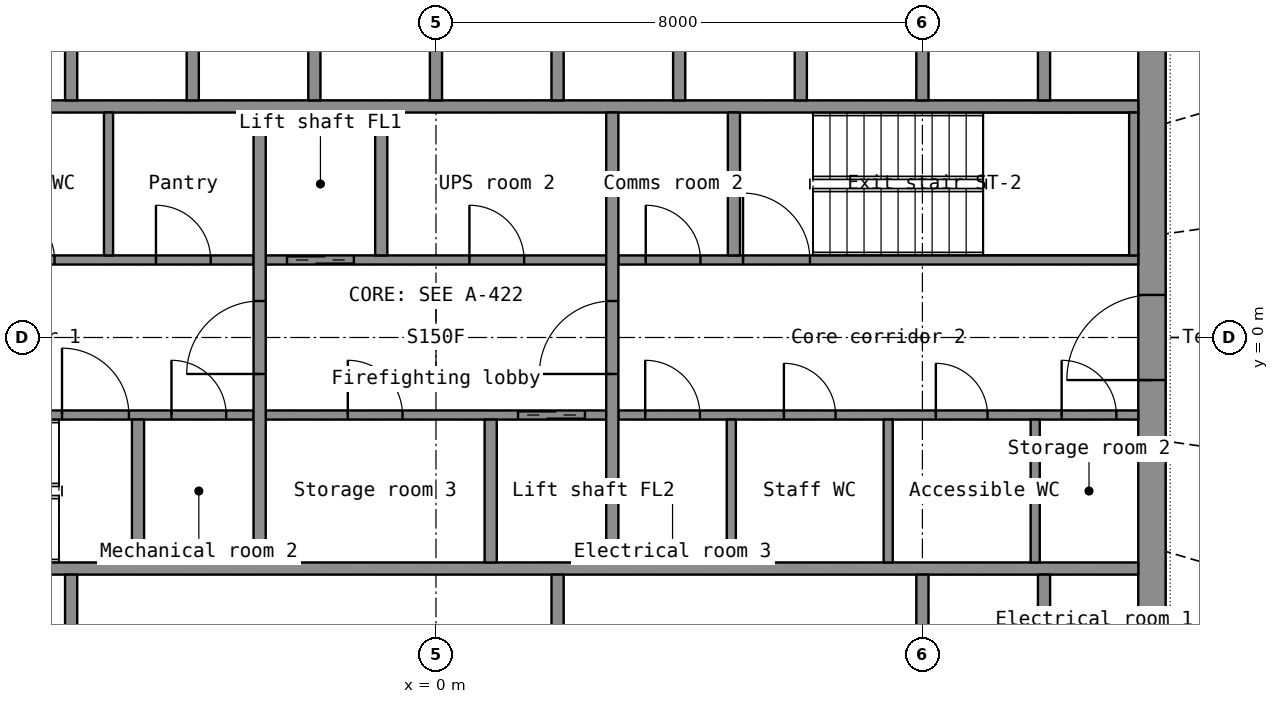
"""IFC4 building model, lengths in metres.
Left out: names, types, materials, properties, quantities, classifications, styles, units other than length and angle.
Written with IfcOpenShell. Run it as: python <this file> out.ifc"""

import sys

from ifc_helpers import new_model, si_unit, direction, frame, frame_2d, origin, place, context, subcontext, project, spatial, rectangle, extrude, element, fill, save


model = new_model("IFC4")
c1 = context("Model", 3, precision=1e-05, world=origin(), true_north=direction((0.0, 1.0)))
c2 = subcontext(c1, "Body", "Model", "MODEL_VIEW")
j1 = project(units=[si_unit("LENGTHUNIT", "METRE"), si_unit("PLANEANGLEUNIT", "RADIAN")], contexts=[c1])
p1 = place(None, origin())
s1 = spatial("IfcSite", under=j1, at=p1, CompositionType="ELEMENT")
p2 = place(p1, origin())
s2 = spatial("IfcBuilding", under=s1, at=p2, CompositionType="ELEMENT")
p3 = place(p2, frame((0.0, 0.0, 160.8)))
s3 = spatial("IfcBuildingStorey", under=s2, at=p3, CompositionType="ELEMENT", Elevation=160.8)
p4 = place(p3, frame((11.775, -7.2, 0.0), z_axis=(0.0, 0.0, 1.0), x_axis=(0.0, 1.0, 0.0)))
e1 = element("IfcWall", 1, at=p4, inside=s3, PredefinedType="SHEAR", context=c2, shape_type="SweptSolid", body=[
    extrude(rectangle(XDim=14.4, YDim=0.45, at=frame_2d((7.2, 0.0))), origin(), (0.0, 0.0, 1.0), 3.3),
])
p5 = place(p4, frame((6.5, 0.0, 0.0)))
e2 = element("IfcOpeningElement", 2, at=p5, cuts=e1, PredefinedType="OPENING", context=c2, shape_type="SweptSolid", body=[
    extrude(rectangle(XDim=1.4, YDim=2.2, at=frame_2d((0.7, 1.1))), frame((0.0, 0.235, 0.0), z_axis=(0.0, -1.0, 0.0), x_axis=(1.0, 0.0, 0.0)), (0.0, 0.0, 1.0), 0.47),
])
for number, where, z_axis, x_axis in (
    (3, (-11.55, -3.8, 0.0), (0.0, 0.0, 1.0), (1.0, 0.0, 0.0)),
    (4, (-11.55, 3.8, 0.0), (0.0, 0.0, 1.0), (1.0, 0.0, 0.0)),
):
    element("IfcWall", number, at=place(p3, frame(where, z_axis=z_axis, x_axis=x_axis)), inside=s3, PredefinedType="SHEAR", context=c2, shape_type="SweptSolid", body=[
        extrude(rectangle(XDim=23.1, YDim=0.2, at=frame_2d((11.55, 0.0))), origin(), (0.0, 0.0, 1.0), 3.3),
    ])
for number, where, z_axis, x_axis in (
    (5, (8.0, -6.75, 0.0), (0.0, 0.0, 1.0), (0.0, 1.0, 0.0)),
    (6, (10.0, -6.75, 0.0), (0.0, 0.0, 1.0), (0.0, 1.0, 0.0)),
):
    element("IfcWall", number, at=place(p3, frame(where, z_axis=z_axis, x_axis=x_axis)), inside=s3, PredefinedType="SHEAR", context=c2, shape_type="SweptSolid", body=[
        extrude(rectangle(XDim=2.85, YDim=0.2, at=frame_2d((1.425, 0.0))), origin(), (0.0, 0.0, 1.0), 3.3),
    ])
for number, where, z_axis, x_axis in (
    (7, (-6.0, -6.75, 0.0), (0.0, 0.0, 1.0), (0.0, 1.0, 0.0)),
    (8, (2.0, -6.75, 0.0), (0.0, 0.0, 1.0), (0.0, 1.0, 0.0)),
):
    element("IfcWall", number, at=place(p3, frame(where, z_axis=z_axis, x_axis=x_axis)), inside=s3, PredefinedType="PARTITIONING", context=c2, shape_type="SweptSolid", body=[
        extrude(rectangle(XDim=2.85, YDim=0.2, at=frame_2d((1.425, 0.0))), origin(), (0.0, 0.0, 1.0), 3.3),
    ])
for number, where, z_axis, x_axis in (
    (9, (-6.0, 3.9, 0.0), (0.0, 0.0, 1.0), (0.0, 1.0, 0.0)),
    (10, (-4.0, 3.9, 0.0), (0.0, 0.0, 1.0), (0.0, 1.0, 0.0)),
    (11, (-2.0, 3.9, 0.0), (0.0, 0.0, 1.0), (0.0, 1.0, 0.0)),
    (12, (0.0, 3.9, 0.0), (0.0, 0.0, 1.0), (0.0, 1.0, 0.0)),
    (13, (2.0, 3.9, 0.0), (0.0, 0.0, 1.0), (0.0, 1.0, 0.0)),
    (14, (4.0, 3.9, 0.0), (0.0, 0.0, 1.0), (0.0, 1.0, 0.0)),
    (15, (6.0, 3.9, 0.0), (0.0, 0.0, 1.0), (0.0, 1.0, 0.0)),
    (16, (8.0, 3.9, 0.0), (0.0, 0.0, 1.0), (0.0, 1.0, 0.0)),
    (17, (10.0, 3.9, 0.0), (0.0, 0.0, 1.0), (0.0, 1.0, 0.0)),
):
    element("IfcWall", number, at=place(p3, frame(where, z_axis=z_axis, x_axis=x_axis)), inside=s3, PredefinedType="SHEAR", context=c2, shape_type="SweptSolid", body=[
        extrude(rectangle(XDim=2.85, YDim=0.2, at=frame_2d((1.425, 0.0))), origin(), (0.0, 0.0, 1.0), 3.3),
    ])
p6 = place(p3, frame((-11.55, -1.275, 0.0), z_axis=(0.0, 0.0, 1.0), x_axis=(1.0, 0.0, 0.0)))
e18 = element("IfcWall", 18, at=p6, inside=s3, PredefinedType="SHEAR", context=c2, shape_type="SweptSolid", body=[
    extrude(rectangle(XDim=8.55, YDim=0.15, at=frame_2d((4.275, 0.0))), origin(), (0.0, 0.0, 1.0), 3.3),
])
p7 = place(p6, frame((5.4, 0.0, 0.0)))
e19 = element("IfcOpeningElement", 19, at=p7, cuts=e18, PredefinedType="OPENING", context=c2, shape_type="SweptSolid", body=[
    extrude(rectangle(XDim=1.1, YDim=2.15, at=frame_2d((0.55, 1.075))), frame((0.0, 0.085, 0.0), z_axis=(0.0, -1.0, 0.0), x_axis=(1.0, 0.0, 0.0)), (0.0, 0.0, 1.0), 0.17),
])
p8 = place(p6, frame((7.2, 0.0, 0.0)))
e20 = element("IfcOpeningElement", 20, at=p8, cuts=e18, PredefinedType="OPENING", context=c2, shape_type="SweptSolid", body=[
    extrude(rectangle(XDim=0.9, YDim=2.1, at=frame_2d((0.45, 1.05))), frame((0.0, 0.085, 0.0), z_axis=(0.0, -1.0, 0.0), x_axis=(1.0, 0.0, 0.0)), (0.0, 0.0, 1.0), 0.17),
])
p9 = place(p3, frame((-2.8, -1.275, 0.0), z_axis=(0.0, 0.0, 1.0), x_axis=(1.0, 0.0, 0.0)))
e21 = element("IfcWall", 21, at=p9, inside=s3, PredefinedType="SHEAR", context=c2, shape_type="SweptSolid", body=[
    extrude(rectangle(XDim=5.6, YDim=0.15, at=frame_2d((2.8, 0.0))), origin(), (0.0, 0.0, 1.0), 3.3),
])
p10 = place(p9, frame((4.15, 0.0, 0.0)))
e22 = element("IfcOpeningElement", 22, at=p10, cuts=e21, PredefinedType="OPENING", context=c2, shape_type="SweptSolid", body=[
    extrude(rectangle(XDim=1.1, YDim=2.2, at=frame_2d((0.55, 1.1))), frame((0.0, 0.085, 0.0), z_axis=(0.0, -1.0, 0.0), x_axis=(1.0, 0.0, 0.0)), (0.0, 0.0, 1.0), 0.17),
])
p11 = place(p9, frame((1.35, 0.0, 0.0)))
e23 = element("IfcOpeningElement", 23, at=p11, cuts=e21, PredefinedType="OPENING", context=c2, shape_type="SweptSolid", body=[
    extrude(rectangle(XDim=0.9, YDim=2.1, at=frame_2d((0.45, 1.05))), frame((0.0, 0.085, 0.0), z_axis=(0.0, -1.0, 0.0), x_axis=(1.0, 0.0, 0.0)), (0.0, 0.0, 1.0), 0.17),
])
p12 = place(p3, frame((3.0, -1.275, 0.0), z_axis=(0.0, 0.0, 1.0), x_axis=(1.0, 0.0, 0.0)))
e24 = element("IfcWall", 24, at=p12, inside=s3, PredefinedType="PARTITIONING", context=c2, shape_type="SweptSolid", body=[
    extrude(rectangle(XDim=8.55, YDim=0.15, at=frame_2d((4.275, 0.0))), origin(), (0.0, 0.0, 1.0), 3.3),
])
p13 = place(p12, frame((0.441, 0.0, 0.0)))
e25 = element("IfcOpeningElement", 25, at=p13, cuts=e24, PredefinedType="OPENING", context=c2, shape_type="SweptSolid", body=[
    extrude(rectangle(XDim=0.9, YDim=2.1, at=frame_2d((0.45, 1.05))), frame((0.0, 0.085, 0.0), z_axis=(0.0, -1.0, 0.0), x_axis=(1.0, 0.0, 0.0)), (0.0, 0.0, 1.0), 0.17),
])
p14 = place(p12, frame((2.722, 0.0, 0.0)))
e26 = element("IfcOpeningElement", 26, at=p14, cuts=e24, PredefinedType="OPENING", context=c2, shape_type="SweptSolid", body=[
    extrude(rectangle(XDim=0.85, YDim=2.1, at=frame_2d((0.425, 1.05))), frame((0.0, 0.085, 0.0), z_axis=(0.0, -1.0, 0.0), x_axis=(1.0, 0.0, 0.0)), (0.0, 0.0, 1.0), 0.17),
])
p15 = place(p12, frame((5.221, 0.0, 0.0)))
e27 = element("IfcOpeningElement", 27, at=p15, cuts=e24, PredefinedType="OPENING", context=c2, shape_type="SweptSolid", body=[
    extrude(rectangle(XDim=0.85, YDim=2.1, at=frame_2d((0.425, 1.05))), frame((0.0, 0.085, 0.0), z_axis=(0.0, -1.0, 0.0), x_axis=(1.0, 0.0, 0.0)), (0.0, 0.0, 1.0), 0.17),
])
p16 = place(p12, frame((7.29, 0.0, 0.0)))
e28 = element("IfcOpeningElement", 28, at=p16, cuts=e24, PredefinedType="OPENING", context=c2, shape_type="SweptSolid", body=[
    extrude(rectangle(XDim=0.9, YDim=2.1, at=frame_2d((0.45, 1.05))), frame((0.0, 0.085, 0.0), z_axis=(0.0, -1.0, 0.0), x_axis=(1.0, 0.0, 0.0)), (0.0, 0.0, 1.0), 0.17),
])
p17 = place(p3, frame((-11.55, 1.275, 0.0), z_axis=(0.0, 0.0, 1.0), x_axis=(1.0, 0.0, 0.0)))
e29 = element("IfcWall", 29, at=p17, inside=s3, PredefinedType="PARTITIONING", context=c2, shape_type="SweptSolid", body=[
    extrude(rectangle(XDim=8.55, YDim=0.15, at=frame_2d((4.275, 0.0))), origin(), (0.0, 0.0, 1.0), 3.3),
])
p18 = place(p17, frame((1.308, 0.0, 0.0)))
e30 = element("IfcOpeningElement", 30, at=p18, cuts=e29, PredefinedType="OPENING", context=c2, shape_type="SweptSolid", body=[
    extrude(rectangle(XDim=0.85, YDim=2.1, at=frame_2d((0.425, 1.05))), frame((0.0, 0.085, 0.0), z_axis=(0.0, -1.0, 0.0), x_axis=(1.0, 0.0, 0.0)), (0.0, 0.0, 1.0), 0.17),
])
p19 = place(p17, frame((4.427, 0.0, 0.0)))
e31 = element("IfcOpeningElement", 31, at=p19, cuts=e29, PredefinedType="OPENING", context=c2, shape_type="SweptSolid", body=[
    extrude(rectangle(XDim=0.85, YDim=2.1, at=frame_2d((0.425, 1.05))), frame((0.0, 0.085, 0.0), z_axis=(0.0, -1.0, 0.0), x_axis=(1.0, 0.0, 0.0)), (0.0, 0.0, 1.0), 0.17),
])
p20 = place(p17, frame((6.945, 0.0, 0.0)))
e32 = element("IfcOpeningElement", 32, at=p20, cuts=e29, PredefinedType="OPENING", context=c2, shape_type="SweptSolid", body=[
    extrude(rectangle(XDim=0.9, YDim=2.1, at=frame_2d((0.45, 1.05))), frame((0.0, 0.085, 0.0), z_axis=(0.0, -1.0, 0.0), x_axis=(1.0, 0.0, 0.0)), (0.0, 0.0, 1.0), 0.17),
])
p21 = place(p3, frame((-2.8, 1.275, 0.0), z_axis=(0.0, 0.0, 1.0), x_axis=(1.0, 0.0, 0.0)))
e33 = element("IfcWall", 33, at=p21, inside=s3, PredefinedType="SHEAR", context=c2, shape_type="SweptSolid", body=[
    extrude(rectangle(XDim=5.6, YDim=0.15, at=frame_2d((2.8, 0.0))), origin(), (0.0, 0.0, 1.0), 3.3),
])
p22 = place(p21, frame((0.35, 0.0, 0.0)))
e34 = element("IfcOpeningElement", 34, at=p22, cuts=e33, PredefinedType="OPENING", context=c2, shape_type="SweptSolid", body=[
    extrude(rectangle(XDim=1.1, YDim=2.2, at=frame_2d((0.55, 1.1))), frame((0.0, 0.085, 0.0), z_axis=(0.0, -1.0, 0.0), x_axis=(1.0, 0.0, 0.0)), (0.0, 0.0, 1.0), 0.17),
])
p23 = place(p21, frame((3.35, 0.0, 0.0)))
e35 = element("IfcOpeningElement", 35, at=p23, cuts=e33, PredefinedType="OPENING", context=c2, shape_type="SweptSolid", body=[
    extrude(rectangle(XDim=0.9, YDim=2.1, at=frame_2d((0.45, 1.05))), frame((0.0, 0.085, 0.0), z_axis=(0.0, -1.0, 0.0), x_axis=(1.0, 0.0, 0.0)), (0.0, 0.0, 1.0), 0.17),
])
p24 = place(p3, frame((3.0, 1.275, 0.0), z_axis=(0.0, 0.0, 1.0), x_axis=(1.0, 0.0, 0.0)))
e36 = element("IfcWall", 36, at=p24, inside=s3, PredefinedType="SHEAR", context=c2, shape_type="SweptSolid", body=[
    extrude(rectangle(XDim=8.55, YDim=0.15, at=frame_2d((4.275, 0.0))), origin(), (0.0, 0.0, 1.0), 3.3),
])
p25 = place(p24, frame((2.05, 0.0, 0.0)))
e37 = element("IfcOpeningElement", 37, at=p25, cuts=e36, PredefinedType="OPENING", context=c2, shape_type="SweptSolid", body=[
    extrude(rectangle(XDim=1.1, YDim=2.15, at=frame_2d((0.55, 1.075))), frame((0.0, 0.085, 0.0), z_axis=(0.0, -1.0, 0.0), x_axis=(1.0, 0.0, 0.0)), (0.0, 0.0, 1.0), 0.17),
])
p26 = place(p24, frame((0.45, 0.0, 0.0)))
e38 = element("IfcOpeningElement", 38, at=p26, cuts=e36, PredefinedType="OPENING", context=c2, shape_type="SweptSolid", body=[
    extrude(rectangle(XDim=0.9, YDim=2.1, at=frame_2d((0.45, 1.05))), frame((0.0, 0.085, 0.0), z_axis=(0.0, -1.0, 0.0), x_axis=(1.0, 0.0, 0.0)), (0.0, 0.0, 1.0), 0.17),
])
p27 = place(p3, frame((-2.9, -3.7, 0.0), z_axis=(0.0, 0.0, 1.0), x_axis=(0.0, 1.0, 0.0)))
e39 = element("IfcWall", 39, at=p27, inside=s3, PredefinedType="SHEAR", context=c2, shape_type="SweptSolid", body=[
    extrude(rectangle(XDim=7.4, YDim=0.2, at=frame_2d((3.7, 0.0))), origin(), (0.0, 0.0, 1.0), 3.3),
])
p28 = place(p27, frame((3.1, 0.0, 0.0)))
e40 = element("IfcOpeningElement", 40, at=p28, cuts=e39, PredefinedType="OPENING", context=c2, shape_type="SweptSolid", body=[
    extrude(rectangle(XDim=1.2, YDim=2.2, at=frame_2d((0.6, 1.1))), frame((0.0, 0.11, 0.0), z_axis=(0.0, -1.0, 0.0), x_axis=(1.0, 0.0, 0.0)), (0.0, 0.0, 1.0), 0.22),
])
p29 = place(p3, frame((2.9, -3.7, 0.0), z_axis=(0.0, 0.0, 1.0), x_axis=(0.0, 1.0, 0.0)))
e41 = element("IfcWall", 41, at=p29, inside=s3, PredefinedType="SHEAR", context=c2, shape_type="SweptSolid", body=[
    extrude(rectangle(XDim=7.4, YDim=0.2, at=frame_2d((3.7, 0.0))), origin(), (0.0, 0.0, 1.0), 3.3),
])
p30 = place(p29, frame((3.1, 0.0, 0.0)))
e42 = element("IfcOpeningElement", 42, at=p30, cuts=e41, PredefinedType="OPENING", context=c2, shape_type="SweptSolid", body=[
    extrude(rectangle(XDim=1.2, YDim=2.2, at=frame_2d((0.6, 1.1))), frame((0.0, 0.11, 0.0), z_axis=(0.0, -1.0, 0.0), x_axis=(1.0, 0.0, 0.0)), (0.0, 0.0, 1.0), 0.22),
])
for number, where, z_axis, x_axis in (
    (43, (-0.9, 1.35, 0.0), (0.0, 0.0, 1.0), (0.0, 1.0, 0.0)),
    (44, (0.9, -3.7, 0.0), (0.0, 0.0, 1.0), (0.0, 1.0, 0.0)),
):
    element("IfcWall", number, at=place(p3, frame(where, z_axis=z_axis, x_axis=x_axis)), inside=s3, PredefinedType="SHEAR", context=c2, shape_type="SweptSolid", body=[
        extrude(rectangle(XDim=2.35, YDim=0.2, at=frame_2d((1.175, 0.0))), origin(), (0.0, 0.0, 1.0), 3.3),
    ])
p31 = place(p3, frame((11.475, 1.35, 0.0), z_axis=(0.0, 0.0, 1.0), x_axis=(0.0, 1.0, 0.0)))
e45 = element("IfcWall", 45, at=p31, inside=s3, PredefinedType="SHEAR", context=c2, shape_type="SweptSolid", body=[
    extrude(rectangle(XDim=2.35, YDim=0.15, at=frame_2d((1.175, 0.0))), origin(), (0.0, 0.0, 1.0), 3.3),
])
for number, where, z_axis, x_axis in (
    (46, (-4.9, -3.7, 0.0), (0.0, 0.0, 1.0), (0.0, 1.0, 0.0)),
    (47, (4.9, 1.35, 0.0), (0.0, 0.0, 1.0), (0.0, 1.0, 0.0)),
):
    element("IfcWall", number, at=place(p3, frame(where, z_axis=z_axis, x_axis=x_axis)), inside=s3, PredefinedType="SHEAR", context=c2, shape_type="SweptSolid", body=[
        extrude(rectangle(XDim=2.35, YDim=0.2, at=frame_2d((1.175, 0.0))), origin(), (0.0, 0.0, 1.0), 3.3),
    ])
for number, where, z_axis, x_axis in (
    (48, (-5.385, 1.35, 0.0), (0.0, 0.0, 1.0), (0.0, 1.0, 0.0)),
    (49, (4.857, -3.7, 0.0), (0.0, 0.0, 1.0), (0.0, 1.0, 0.0)),
    (50, (7.437, -3.7, 0.0), (0.0, 0.0, 1.0), (0.0, 1.0, 0.0)),
    (51, (9.855, -3.7, 0.0), (0.0, 0.0, 1.0), (0.0, 1.0, 0.0)),
):
    element("IfcWall", number, at=place(p3, frame(where, z_axis=z_axis, x_axis=x_axis)), inside=s3, PredefinedType="PARTITIONING", context=c2, shape_type="SweptSolid", body=[
        extrude(rectangle(XDim=2.35, YDim=0.15, at=frame_2d((1.175, 0.0))), origin(), (0.0, 0.0, 1.0), 3.3),
    ])
p32 = place(p5, origin())
e52 = element("IfcDoor", 52, at=p32, inside=s3, OperationType="DOUBLE_DOOR_SINGLE_SWING", PredefinedType="DOOR", context=c2, shape_type="SweptSolid", body=[
    extrude(rectangle(XDim=1.4, YDim=2.2, at=frame_2d((0.7, 1.1))), frame((0.0, 0.025, 0.0), z_axis=(0.0, -1.0, 0.0), x_axis=(1.0, 0.0, 0.0)), (0.0, 0.0, 1.0), 0.05),
])
fill(e2, e52)
p33 = place(p28, origin())
e53 = element("IfcDoor", 53, at=p33, inside=s3, OperationType="SINGLE_SWING_LEFT", PredefinedType="DOOR", context=c2, shape_type="SweptSolid", body=[
    extrude(rectangle(XDim=1.2, YDim=2.2, at=frame_2d((0.6, 1.1))), frame((0.0, 0.025, 0.0), z_axis=(0.0, -1.0, 0.0), x_axis=(1.0, 0.0, 0.0)), (0.0, 0.0, 1.0), 0.05),
])
fill(e40, e53)
p34 = place(p30, origin())
e54 = element("IfcDoor", 54, at=p34, inside=s3, OperationType="SINGLE_SWING_LEFT", PredefinedType="DOOR", context=c2, shape_type="SweptSolid", body=[
    extrude(rectangle(XDim=1.2, YDim=2.2, at=frame_2d((0.6, 1.1))), frame((0.0, 0.025, 0.0), z_axis=(0.0, -1.0, 0.0), x_axis=(1.0, 0.0, 0.0)), (0.0, 0.0, 1.0), 0.05),
])
fill(e42, e54)
p35 = place(p22, origin())
e55 = element("IfcDoor", 55, at=p35, inside=s3, OperationType="DOUBLE_DOOR_SLIDING", PredefinedType="DOOR", context=c2, shape_type="SweptSolid", body=[
    extrude(rectangle(XDim=1.1, YDim=2.2, at=frame_2d((0.55, 1.1))), frame((0.0, 0.025, 0.0), z_axis=(0.0, -1.0, 0.0), x_axis=(1.0, 0.0, 0.0)), (0.0, 0.0, 1.0), 0.05),
])
fill(e34, e55)
p36 = place(p10, origin())
e56 = element("IfcDoor", 56, at=p36, inside=s3, OperationType="DOUBLE_DOOR_SLIDING", PredefinedType="DOOR", context=c2, shape_type="SweptSolid", body=[
    extrude(rectangle(XDim=1.1, YDim=2.2, at=frame_2d((0.55, 1.1))), frame((0.0, 0.025, 0.0), z_axis=(0.0, -1.0, 0.0), x_axis=(1.0, 0.0, 0.0)), (0.0, 0.0, 1.0), 0.05),
])
fill(e22, e56)
p37 = place(p7, origin())
e57 = element("IfcDoor", 57, at=p37, inside=s3, OperationType="SINGLE_SWING_LEFT", PredefinedType="DOOR", context=c2, shape_type="SweptSolid", body=[
    extrude(rectangle(XDim=1.1, YDim=2.15, at=frame_2d((0.55, 1.075))), frame((0.0, 0.025, 0.0), z_axis=(0.0, -1.0, 0.0), x_axis=(1.0, 0.0, 0.0)), (0.0, 0.0, 1.0), 0.05),
])
fill(e19, e57)
p38 = place(p25, origin())
e58 = element("IfcDoor", 58, at=p38, inside=s3, OperationType="SINGLE_SWING_LEFT", PredefinedType="DOOR", context=c2, shape_type="SweptSolid", body=[
    extrude(rectangle(XDim=1.1, YDim=2.15, at=frame_2d((0.55, 1.075))), frame((0.0, 0.025, 0.0), z_axis=(0.0, -1.0, 0.0), x_axis=(1.0, 0.0, 0.0)), (0.0, 0.0, 1.0), 0.05),
])
fill(e37, e58)
p39 = place(p19, origin())
e59 = element("IfcDoor", 59, at=p39, inside=s3, OperationType="SINGLE_SWING_LEFT", PredefinedType="DOOR", context=c2, shape_type="SweptSolid", body=[
    extrude(rectangle(XDim=0.85, YDim=2.1, at=frame_2d((0.425, 1.05))), frame((0.0, 0.025, 0.0), z_axis=(0.0, -1.0, 0.0), x_axis=(1.0, 0.0, 0.0)), (0.0, 0.0, 1.0), 0.05),
])
fill(e31, e59)
p40 = place(p20, origin())
e60 = element("IfcDoor", 60, at=p40, inside=s3, OperationType="SINGLE_SWING_LEFT", PredefinedType="DOOR", context=c2, shape_type="SweptSolid", body=[
    extrude(rectangle(XDim=0.9, YDim=2.1, at=frame_2d((0.45, 1.05))), frame((0.0, 0.025, 0.0), z_axis=(0.0, -1.0, 0.0), x_axis=(1.0, 0.0, 0.0)), (0.0, 0.0, 1.0), 0.05),
])
fill(e32, e60)
p41 = place(p13, origin())
e61 = element("IfcDoor", 61, at=p41, inside=s3, OperationType="SINGLE_SWING_LEFT", PredefinedType="DOOR", context=c2, shape_type="SweptSolid", body=[
    extrude(rectangle(XDim=0.9, YDim=2.1, at=frame_2d((0.45, 1.05))), frame((0.0, 0.025, 0.0), z_axis=(0.0, -1.0, 0.0), x_axis=(1.0, 0.0, 0.0)), (0.0, 0.0, 1.0), 0.05),
])
fill(e25, e61)
p42 = place(p14, origin())
e62 = element("IfcDoor", 62, at=p42, inside=s3, OperationType="SINGLE_SWING_LEFT", PredefinedType="DOOR", context=c2, shape_type="SweptSolid", body=[
    extrude(rectangle(XDim=0.85, YDim=2.1, at=frame_2d((0.425, 1.05))), frame((0.0, 0.025, 0.0), z_axis=(0.0, -1.0, 0.0), x_axis=(1.0, 0.0, 0.0)), (0.0, 0.0, 1.0), 0.05),
])
fill(e26, e62)
p43 = place(p15, origin())
e63 = element("IfcDoor", 63, at=p43, inside=s3, OperationType="SINGLE_SWING_LEFT", PredefinedType="DOOR", context=c2, shape_type="SweptSolid", body=[
    extrude(rectangle(XDim=0.85, YDim=2.1, at=frame_2d((0.425, 1.05))), frame((0.0, 0.025, 0.0), z_axis=(0.0, -1.0, 0.0), x_axis=(1.0, 0.0, 0.0)), (0.0, 0.0, 1.0), 0.05),
])
fill(e27, e63)
p44 = place(p16, origin())
e64 = element("IfcDoor", 64, at=p44, inside=s3, OperationType="SINGLE_SWING_LEFT", PredefinedType="DOOR", context=c2, shape_type="SweptSolid", body=[
    extrude(rectangle(XDim=0.9, YDim=2.1, at=frame_2d((0.45, 1.05))), frame((0.0, 0.025, 0.0), z_axis=(0.0, -1.0, 0.0), x_axis=(1.0, 0.0, 0.0)), (0.0, 0.0, 1.0), 0.05),
])
fill(e28, e64)
p45 = place(p23, origin())
e65 = element("IfcDoor", 65, at=p45, inside=s3, OperationType="SINGLE_SWING_LEFT", PredefinedType="DOOR", context=c2, shape_type="SweptSolid", body=[
    extrude(rectangle(XDim=0.9, YDim=2.1, at=frame_2d((0.45, 1.05))), frame((0.0, 0.025, 0.0), z_axis=(0.0, -1.0, 0.0), x_axis=(1.0, 0.0, 0.0)), (0.0, 0.0, 1.0), 0.05),
])
fill(e35, e65)
p46 = place(p11, origin())
e66 = element("IfcDoor", 66, at=p46, inside=s3, OperationType="SINGLE_SWING_LEFT", PredefinedType="DOOR", context=c2, shape_type="SweptSolid", body=[
    extrude(rectangle(XDim=0.9, YDim=2.1, at=frame_2d((0.45, 1.05))), frame((0.0, 0.025, 0.0), z_axis=(0.0, -1.0, 0.0), x_axis=(1.0, 0.0, 0.0)), (0.0, 0.0, 1.0), 0.05),
])
fill(e23, e66)
p47 = place(p26, origin())
e67 = element("IfcDoor", 67, at=p47, inside=s3, OperationType="SINGLE_SWING_LEFT", PredefinedType="DOOR", context=c2, shape_type="SweptSolid", body=[
    extrude(rectangle(XDim=0.9, YDim=2.1, at=frame_2d((0.45, 1.05))), frame((0.0, 0.025, 0.0), z_axis=(0.0, -1.0, 0.0), x_axis=(1.0, 0.0, 0.0)), (0.0, 0.0, 1.0), 0.05),
])
fill(e38, e67)
p48 = place(p8, origin())
e68 = element("IfcDoor", 68, at=p48, inside=s3, OperationType="SINGLE_SWING_LEFT", PredefinedType="DOOR", context=c2, shape_type="SweptSolid", body=[
    extrude(rectangle(XDim=0.9, YDim=2.1, at=frame_2d((0.45, 1.05))), frame((0.0, 0.025, 0.0), z_axis=(0.0, -1.0, 0.0), x_axis=(1.0, 0.0, 0.0)), (0.0, 0.0, 1.0), 0.05),
])
fill(e20, e68)
save(model, sys.argv[1])
